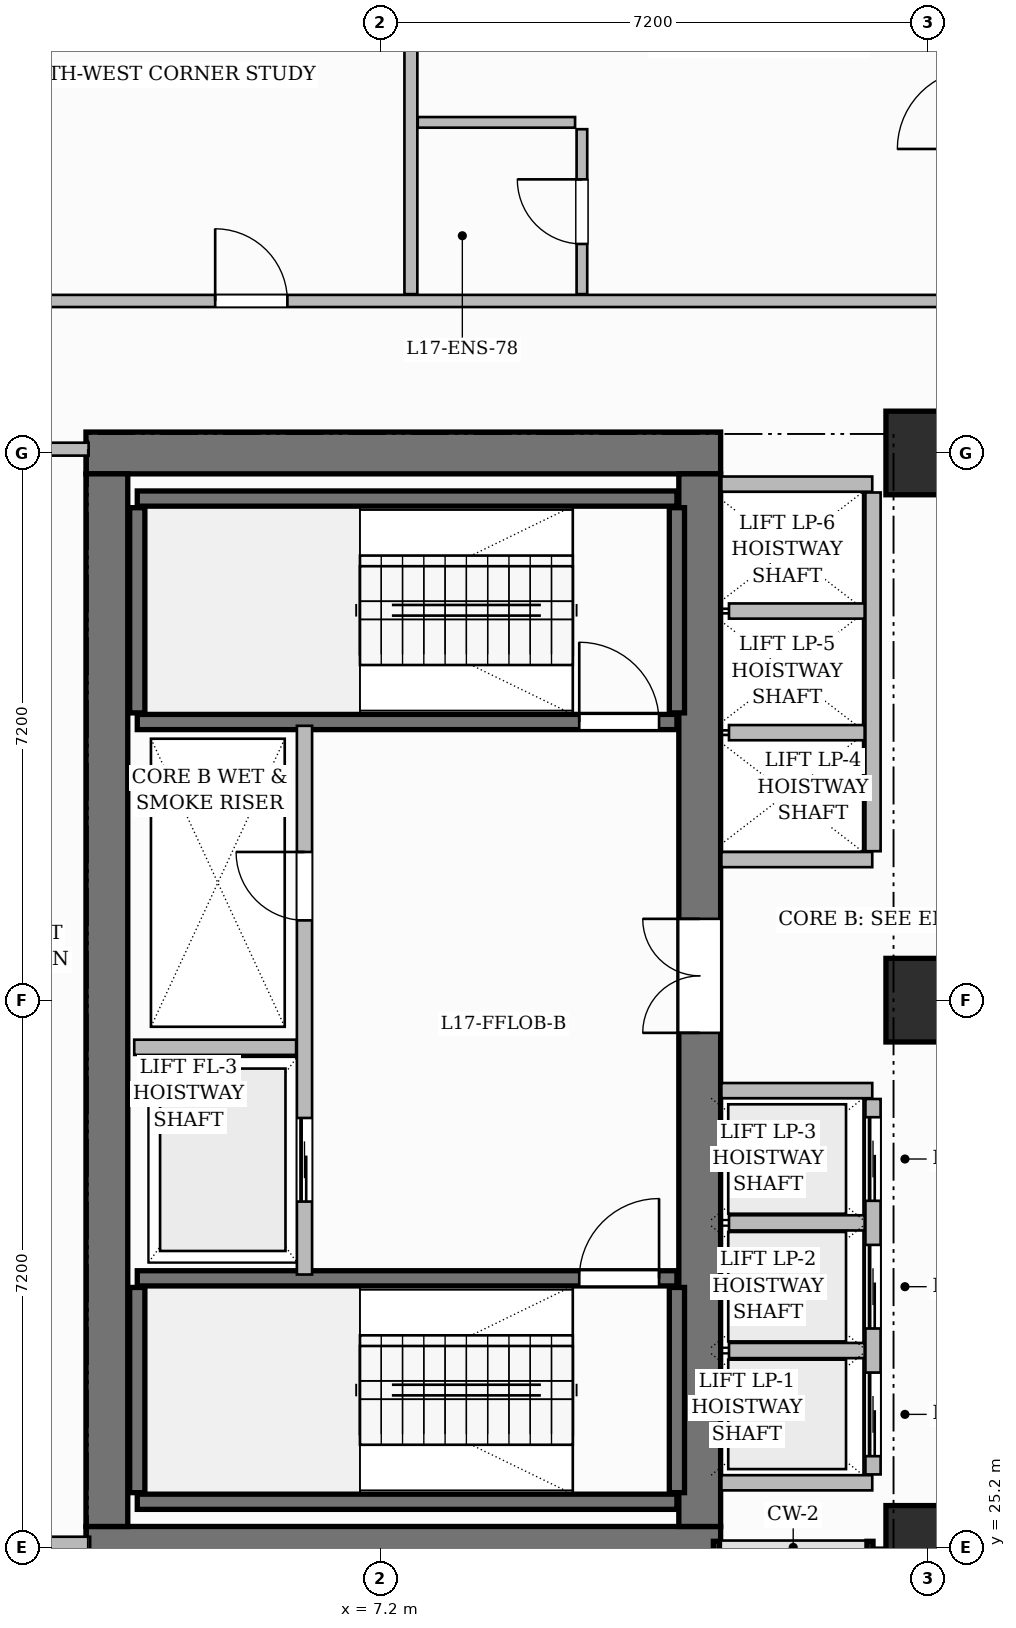
"""IFC4 building model, lengths in metres.
Left out: names, types, materials, properties, quantities, classifications, styles, units other than length and angle.
Written with IfcOpenShell. Run it as: python <this file> out.ifc"""

import sys

from ifc_helpers import new_model, si_unit, direction, frame, frame_2d, origin, origin_2d, place, context, subcontext, project, spatial, rectangle, extrude, source, transform, mapped, element, fill, save


model = new_model("IFC4")
c1 = context("Model", 3, precision=1e-05, world=origin(), true_north=direction((0.0, 1.0)))
c2 = subcontext(c1, "Body", "Model", "MODEL_VIEW")
j1 = project(units=[si_unit("LENGTHUNIT", "METRE"), si_unit("PLANEANGLEUNIT", "RADIAN")], contexts=[c1])
p1 = place(None, origin())
s1 = spatial("IfcSite", under=j1, at=p1, CompositionType="ELEMENT")
p2 = place(p1, origin())
s2 = spatial("IfcBuilding", under=s1, at=p2, CompositionType="ELEMENT")
p3 = place(p2, frame((0.0, 0.0, 73.1)))
s3 = spatial("IfcBuildingStorey", under=s2, at=p3, CompositionType="ELEMENT", Elevation=73.1)
for number, where, z_axis, x_axis in (
    (1, (3.325, 25.2, 0.0), (0.0, 0.0, 1.0), (1.0, 0.0, 0.0)),
    (2, (3.325, 39.6, 0.0), (0.0, 0.0, 1.0), (1.0, 0.0, 0.0)),
):
    element("IfcWall", number, at=place(p3, frame(where, z_axis=z_axis, x_axis=x_axis)), inside=s3, PredefinedType="SHEAR", context=c2, shape_type="SweptSolid", body=[
        extrude(rectangle(XDim=8.35, YDim=0.55, at=frame_2d((4.175, 0.0))), origin(), (0.0, 0.0, 1.0), 3.7),
    ])
p4 = place(p3, frame((3.6, 25.475, 0.0), z_axis=(0.0, 0.0, 1.0), x_axis=(0.0, 1.0, 0.0)))
e3 = element("IfcWall", 3, at=p4, inside=s3, PredefinedType="SHEAR", context=c2, shape_type="SweptSolid", body=[
    extrude(rectangle(XDim=13.85, YDim=0.55, at=frame_2d((6.925, 0.0))), origin(), (0.0, 0.0, 1.0), 3.7),
])
p5 = place(p3, frame((11.4, 25.475, 0.0), z_axis=(0.0, 0.0, 1.0), x_axis=(0.0, 1.0, 0.0)))
e4 = element("IfcWall", 4, at=p5, inside=s3, PredefinedType="SHEAR", context=c2, shape_type="SweptSolid", body=[
    extrude(rectangle(XDim=13.85, YDim=0.55, at=frame_2d((6.925, 0.0))), origin(), (0.0, 0.0, 1.0), 3.7),
])
p6 = place(p5, frame((6.495, 0.0, 0.0)))
e5 = element("IfcOpeningElement", 5, at=p6, cuts=e4, PredefinedType="OPENING", context=c2, shape_type="SweptSolid", body=[
    extrude(rectangle(XDim=1.5, YDim=2.2, at=frame_2d((0.75, 1.1))), frame((0.0, 0.285, 0.0), z_axis=(0.0, -1.0, 0.0), x_axis=(1.0, 0.0, 0.0)), (0.0, 0.0, 1.0), 0.57),
])
m1 = source(origin(), c2, "Body", "SweptSolid", [
    extrude(rectangle(XDim=1.1, YDim=1.1, at=origin_2d()), origin(), (0.0, 0.0, 1.0), 3.7),
])
for number, where, z_axis, x_axis in (
    (6, (14.4, 25.2, 0.0), (0.0, 0.0, 1.0), (1.0, 0.0, 0.0)),
    (7, (14.4, 32.4, 0.0), (0.0, 0.0, 1.0), (1.0, 0.0, 0.0)),
    (8, (14.4, 39.6, 0.0), (0.0, 0.0, 1.0), (1.0, 0.0, 0.0)),
):
    element("IfcColumn", number, at=place(p3, frame(where, z_axis=z_axis, x_axis=x_axis)), inside=s3, PredefinedType="COLUMN", context=c2, shape_type="MappedRepresentation", body=[
        mapped(m1, transform((0.0, 0.0, 0.0), scale=1.0)),
    ])
p7 = place(p3, frame((4.0, 25.8, 0.0), z_axis=(0.0, 0.0, 1.0), x_axis=(1.0, 0.0, 0.0)))
e9 = element("IfcWall", 9, at=p7, inside=s3, PredefinedType="SHEAR", context=c2, shape_type="SweptSolid", body=[
    extrude(rectangle(XDim=7.1, YDim=0.2, at=frame_2d((3.55, 0.0))), origin(), (0.0, 0.0, 1.0), 3.7),
])
for number, where, z_axis, x_axis in (
    (10, (4.0, 25.92, 0.0), (0.0, 0.0, 1.0), (0.0, 1.0, 0.0)),
    (11, (11.1, 25.92, 0.0), (0.0, 0.0, 1.0), (0.0, 1.0, 0.0)),
):
    element("IfcWall", number, at=place(p3, frame(where, z_axis=z_axis, x_axis=x_axis)), inside=s3, PredefinedType="SHEAR", context=c2, shape_type="SweptSolid", body=[
        extrude(rectangle(XDim=2.7, YDim=0.2, at=frame_2d((1.35, 0.0))), origin(), (0.0, 0.0, 1.0), 3.7),
    ])
p8 = place(p3, frame((4.0, 28.74, 0.0), z_axis=(0.0, 0.0, 1.0), x_axis=(1.0, 0.0, 0.0)))
e12 = element("IfcWall", 12, at=p8, inside=s3, PredefinedType="SHEAR", context=c2, shape_type="SweptSolid", body=[
    extrude(rectangle(XDim=7.1, YDim=0.2, at=frame_2d((3.55, 0.0))), origin(), (0.0, 0.0, 1.0), 3.7),
])
p9 = place(p8, frame((5.815, 0.0, 0.0)))
e13 = element("IfcOpeningElement", 13, at=p9, cuts=e12, PredefinedType="OPENING", context=c2, shape_type="SweptSolid", body=[
    extrude(rectangle(XDim=1.05, YDim=2.2, at=frame_2d((0.525, 1.1))), frame((0.0, 0.11, 0.0), z_axis=(0.0, -1.0, 0.0), x_axis=(1.0, 0.0, 0.0)), (0.0, 0.0, 1.0), 0.22),
])
p10 = place(p3, frame((4.0, 39.0, 0.0), z_axis=(0.0, 0.0, 1.0), x_axis=(1.0, 0.0, 0.0)))
e14 = element("IfcWall", 14, at=p10, inside=s3, PredefinedType="SHEAR", context=c2, shape_type="SweptSolid", body=[
    extrude(rectangle(XDim=7.1, YDim=0.2, at=frame_2d((3.55, 0.0))), origin(), (0.0, 0.0, 1.0), 3.7),
])
for number, where, z_axis, x_axis in (
    (15, (4.0, 36.18, 0.0), (0.0, 0.0, 1.0), (0.0, 1.0, 0.0)),
    (16, (11.1, 36.18, 0.0), (0.0, 0.0, 1.0), (0.0, 1.0, 0.0)),
):
    element("IfcWall", number, at=place(p3, frame(where, z_axis=z_axis, x_axis=x_axis)), inside=s3, PredefinedType="SHEAR", context=c2, shape_type="SweptSolid", body=[
        extrude(rectangle(XDim=2.7, YDim=0.2, at=frame_2d((1.35, 0.0))), origin(), (0.0, 0.0, 1.0), 3.7),
    ])
p11 = place(p3, frame((4.0, 36.06, 0.0), z_axis=(0.0, 0.0, 1.0), x_axis=(1.0, 0.0, 0.0)))
e17 = element("IfcWall", 17, at=p11, inside=s3, PredefinedType="SHEAR", context=c2, shape_type="SweptSolid", body=[
    extrude(rectangle(XDim=7.1, YDim=0.2, at=frame_2d((3.55, 0.0))), origin(), (0.0, 0.0, 1.0), 3.7),
])
p12 = place(p11, frame((5.815, 0.0, 0.0)))
e18 = element("IfcOpeningElement", 18, at=p12, cuts=e17, PredefinedType="OPENING", context=c2, shape_type="SweptSolid", body=[
    extrude(rectangle(XDim=1.05, YDim=2.2, at=frame_2d((0.525, 1.1))), frame((0.0, 0.11, 0.0), z_axis=(0.0, -1.0, 0.0), x_axis=(1.0, 0.0, 0.0)), (0.0, 0.0, 1.0), 0.22),
])
p13 = place(p3, frame((6.2, 28.79, 0.0), z_axis=(0.0, 0.0, 1.0), x_axis=(0.0, 1.0, 0.0)))
e19 = element("IfcWall", 19, at=p13, inside=s3, PredefinedType="PARTITIONING", context=c2, shape_type="SweptSolid", body=[
    extrude(rectangle(XDim=7.22, YDim=0.2, at=frame_2d((3.61, 0.0))), origin(), (0.0, 0.0, 1.0), 3.45),
])
p14 = place(p13, frame((4.66, 0.0, 0.0)))
e20 = element("IfcOpeningElement", 20, at=p14, cuts=e19, PredefinedType="OPENING", context=c2, shape_type="SweptSolid", body=[
    extrude(rectangle(XDim=0.9, YDim=2.1, at=frame_2d((0.45, 1.05))), frame((0.0, 0.11, 0.0), z_axis=(0.0, -1.0, 0.0), x_axis=(1.0, 0.0, 0.0)), (0.0, 0.0, 1.0), 0.22),
])
p15 = place(p13, frame((0.96, 0.0, 0.0)))
e21 = element("IfcOpeningElement", 21, at=p15, cuts=e19, PredefinedType="OPENING", context=c2, shape_type="SweptSolid", body=[
    extrude(rectangle(XDim=1.1, YDim=2.2, at=frame_2d((0.55, 1.1))), frame((0.0, 0.11, 0.0), z_axis=(0.0, -1.0, 0.0), x_axis=(1.0, 0.0, 0.0)), (0.0, 0.0, 1.0), 0.22),
])
p16 = place(p3, frame((3.96, 31.78, 0.0), z_axis=(0.0, 0.0, 1.0), x_axis=(1.0, 0.0, 0.0)))
e22 = element("IfcWall", 22, at=p16, inside=s3, PredefinedType="PARTITIONING", context=c2, shape_type="SweptSolid", body=[
    extrude(rectangle(XDim=2.13, YDim=0.2, at=frame_2d((1.065, 0.0))), origin(), (0.0, 0.0, 1.0), 3.45),
])
for number, where, z_axis, x_axis in (
    (23, (11.685, 26.05, 0.0), (0.0, 0.0, 1.0), (1.0, 0.0, 0.0)),
    (24, (11.685, 31.21, 0.0), (0.0, 0.0, 1.0), (1.0, 0.0, 0.0)),
):
    element("IfcWall", number, at=place(p3, frame(where, z_axis=z_axis, x_axis=x_axis)), inside=s3, PredefinedType="PARTITIONING", context=c2, shape_type="SweptSolid", body=[
        extrude(rectangle(XDim=1.985, YDim=0.2, at=frame_2d((0.992, 0.0))), origin(), (0.0, 0.0, 1.0), 3.45),
    ])
p17 = place(p3, frame((13.68, 26.16, 0.0), z_axis=(0.0, 0.0, 1.0), x_axis=(0.0, 1.0, 0.0)))
e25 = element("IfcWall", 25, at=p17, inside=s3, PredefinedType="PARTITIONING", context=c2, shape_type="SweptSolid", body=[
    extrude(rectangle(XDim=4.94, YDim=0.2, at=frame_2d((2.47, 0.0))), origin(), (0.0, 0.0, 1.0), 3.45),
])
p18 = place(p17, frame((0.24, 0.0, 0.0)))
e26 = element("IfcOpeningElement", 26, at=p18, cuts=e25, PredefinedType="OPENING", context=c2, shape_type="SweptSolid", body=[
    extrude(rectangle(XDim=1.1, YDim=2.2, at=frame_2d((0.55, 1.1))), frame((0.0, 0.11, 0.0), z_axis=(0.0, -1.0, 0.0), x_axis=(1.0, 0.0, 0.0)), (0.0, 0.0, 1.0), 0.22),
])
p19 = place(p17, frame((1.92, 0.0, 0.0)))
e27 = element("IfcOpeningElement", 27, at=p19, cuts=e25, PredefinedType="OPENING", context=c2, shape_type="SweptSolid", body=[
    extrude(rectangle(XDim=1.1, YDim=2.2, at=frame_2d((0.55, 1.1))), frame((0.0, 0.11, 0.0), z_axis=(0.0, -1.0, 0.0), x_axis=(1.0, 0.0, 0.0)), (0.0, 0.0, 1.0), 0.22),
])
p20 = place(p17, frame((3.6, 0.0, 0.0)))
e28 = element("IfcOpeningElement", 28, at=p20, cuts=e25, PredefinedType="OPENING", context=c2, shape_type="SweptSolid", body=[
    extrude(rectangle(XDim=1.1, YDim=2.2, at=frame_2d((0.55, 1.1))), frame((0.0, 0.11, 0.0), z_axis=(0.0, -1.0, 0.0), x_axis=(1.0, 0.0, 0.0)), (0.0, 0.0, 1.0), 0.22),
])
for number, where, z_axis, x_axis in (
    (29, (11.785, 27.79, 0.0), (0.0, 0.0, 1.0), (1.0, 0.0, 0.0)),
    (30, (11.785, 29.47, 0.0), (0.0, 0.0, 1.0), (1.0, 0.0, 0.0)),
):
    element("IfcWall", number, at=place(p3, frame(where, z_axis=z_axis, x_axis=x_axis)), inside=s3, PredefinedType="PARTITIONING", context=c2, shape_type="SweptSolid", body=[
        extrude(rectangle(XDim=1.785, YDim=0.2, at=frame_2d((0.893, 0.0))), origin(), (0.0, 0.0, 1.0), 3.45),
    ])
for number, where, z_axis, x_axis in (
    (31, (11.685, 34.25, 0.0), (0.0, 0.0, 1.0), (1.0, 0.0, 0.0)),
    (32, (11.685, 39.19, 0.0), (0.0, 0.0, 1.0), (1.0, 0.0, 0.0)),
):
    element("IfcWall", number, at=place(p3, frame(where, z_axis=z_axis, x_axis=x_axis)), inside=s3, PredefinedType="PARTITIONING", context=c2, shape_type="SweptSolid", body=[
        extrude(rectangle(XDim=1.985, YDim=0.2, at=frame_2d((0.992, 0.0))), origin(), (0.0, 0.0, 1.0), 3.45),
    ])
p21 = place(p3, frame((13.68, 34.36, 0.0), z_axis=(0.0, 0.0, 1.0), x_axis=(0.0, 1.0, 0.0)))
e33 = element("IfcWall", 33, at=p21, inside=s3, PredefinedType="PARTITIONING", context=c2, shape_type="SweptSolid", body=[
    extrude(rectangle(XDim=4.72, YDim=0.2, at=frame_2d((2.36, 0.0))), origin(), (0.0, 0.0, 1.0), 3.45),
])
for number, where, z_axis, x_axis in (
    (34, (11.785, 35.92, 0.0), (0.0, 0.0, 1.0), (1.0, 0.0, 0.0)),
    (35, (11.785, 37.52, 0.0), (0.0, 0.0, 1.0), (1.0, 0.0, 0.0)),
):
    element("IfcWall", number, at=place(p3, frame(where, z_axis=z_axis, x_axis=x_axis)), inside=s3, PredefinedType="PARTITIONING", context=c2, shape_type="SweptSolid", body=[
        extrude(rectangle(XDim=1.785, YDim=0.2, at=frame_2d((0.893, 0.0))), origin(), (0.0, 0.0, 1.0), 3.45),
    ])
p22 = place(p3, frame((0.24, 39.65, 0.0), z_axis=(0.0, 0.0, 1.0), x_axis=(1.0, 0.0, 0.0)))
e36 = element("IfcWall", 36, at=p22, inside=s3, PredefinedType="PARTITIONING", context=c2, shape_type="SweptSolid", body=[
    extrude(rectangle(XDim=3.12, YDim=0.17, at=frame_2d((1.56, 0.0))), origin(), (0.0, 0.0, 1.0), 3.45),
])
p23 = place(p22, frame((1.11, 0.0, 0.0)))
e37 = element("IfcOpeningElement", 37, at=p23, cuts=e36, PredefinedType="OPENING", context=c2, shape_type="SweptSolid", body=[
    extrude(rectangle(XDim=0.9, YDim=2.15, at=frame_2d((0.45, 1.075))), frame((0.0, 0.095, 0.0), z_axis=(0.0, -1.0, 0.0), x_axis=(1.0, 0.0, 0.0)), (0.0, 0.0, 1.0), 0.19),
])
p24 = place(p3, frame((7.6, 41.69, 0.0), z_axis=(0.0, 0.0, 1.0), x_axis=(0.0, 1.0, 0.0)))
e38 = element("IfcWall", 38, at=p24, inside=s3, PredefinedType="PARTITIONING", context=c2, shape_type="SweptSolid", body=[
    extrude(rectangle(XDim=4.87, YDim=0.17, at=frame_2d((2.435, 0.0))), origin(), (0.0, 0.0, 1.0), 3.45),
])
p25 = place(p3, frame((0.148, 41.6, 0.0), z_axis=(0.0, 0.0, 1.0), x_axis=(1.0, 0.0, 0.0)))
e39 = element("IfcWall", 39, at=p25, inside=s3, PredefinedType="PARTITIONING", context=c2, shape_type="SweptSolid", body=[
    extrude(rectangle(XDim=14.812, YDim=0.16, at=frame_2d((7.406, 0.0))), origin(), (0.0, 0.0, 1.0), 2.885),
])
p26 = place(p25, frame((4.877, 0.0, 0.0)))
e40 = element("IfcOpeningElement", 40, at=p26, cuts=e39, PredefinedType="OPENING", context=c2, shape_type="SweptSolid", body=[
    extrude(rectangle(XDim=0.95, YDim=2.15, at=frame_2d((0.475, 1.075))), frame((0.0, 0.09, 0.0), z_axis=(0.0, -1.0, 0.0), x_axis=(1.0, 0.0, 0.0)), (0.0, 0.0, 1.0), 0.18),
])
p27 = place(p3, frame((7.69, 43.95, 0.0), z_axis=(0.0, 0.0, 1.0), x_axis=(1.0, 0.0, 0.0)))
e41 = element("IfcWall", 41, at=p27, inside=s3, PredefinedType="PARTITIONING", context=c2, shape_type="SweptSolid", body=[
    extrude(rectangle(XDim=2.07, YDim=0.14, at=frame_2d((1.035, 0.0))), origin(), (0.0, 0.0, 1.0), 2.885),
])
p28 = place(p3, frame((9.85, 41.69, 0.0), z_axis=(0.0, 0.0, 1.0), x_axis=(0.0, 1.0, 0.0)))
e42 = element("IfcWall", 42, at=p28, inside=s3, PredefinedType="PARTITIONING", context=c2, shape_type="SweptSolid", body=[
    extrude(rectangle(XDim=2.17, YDim=0.14, at=frame_2d((1.085, 0.0))), origin(), (0.0, 0.0, 1.0), 3.45),
])
p29 = place(p28, frame((0.66, 0.0, 0.0)))
e43 = element("IfcOpeningElement", 43, at=p29, cuts=e42, PredefinedType="OPENING", context=c2, shape_type="SweptSolid", body=[
    extrude(rectangle(XDim=0.85, YDim=2.1, at=frame_2d((0.425, 1.05))), frame((0.0, 0.08, 0.0), z_axis=(0.0, -1.0, 0.0), x_axis=(1.0, 0.0, 0.0)), (0.0, 0.0, 1.0), 0.16),
])
p30 = place(p3, frame((0.0, 25.2, 0.0), z_axis=(0.0, 0.0, 1.0), x_axis=(1.0, 0.0, 0.0)))
e44 = element("IfcWall", 44, at=p30, inside=s3, PredefinedType="SOLIDWALL", context=c2, shape_type="SweptSolid", body=[
    extrude(rectangle(XDim=3.38, YDim=0.28, at=frame_2d((1.69, 0.0))), origin(), (0.0, 0.0, 1.0), 3.45),
])
p31 = place(p30, frame((1.205, 0.0, 0.8)))
e45 = element("IfcOpeningElement", 45, at=p31, cuts=e44, PredefinedType="OPENING", context=c2, shape_type="SweptSolid", body=[
    extrude(rectangle(XDim=1.4, YDim=1.85, at=frame_2d((0.7, 0.925))), frame((0.0, 0.15, 0.0), z_axis=(0.0, -1.0, 0.0), x_axis=(1.0, 0.0, 0.0)), (0.0, 0.0, 1.0), 0.3),
])
m2 = source(origin(), c2, "Body", "SweptSolid", [
    extrude(rectangle(XDim=1.05, YDim=2.2, at=frame_2d((0.525, 1.1))), frame((0.0, 0.025, 0.0), z_axis=(0.0, -1.0, 0.0), x_axis=(1.0, 0.0, 0.0)), (0.0, 0.0, 1.0), 0.05),
])
p32 = place(p9, origin())
e46 = element("IfcDoor", 46, at=p32, inside=s3, OperationType="SINGLE_SWING_RIGHT", PredefinedType="DOOR", context=c2, shape_type="MappedRepresentation", body=[
    mapped(m2, transform((0.0, 0.0, 0.0), scale=1.0)),
])
fill(e13, e46)
p33 = place(p12, origin())
e47 = element("IfcDoor", 47, at=p33, inside=s3, OperationType="SINGLE_SWING_LEFT", PredefinedType="DOOR", context=c2, shape_type="MappedRepresentation", body=[
    mapped(m2, transform((0.0, 0.0, 0.0), scale=1.0)),
])
fill(e18, e47)
m3 = source(origin(), c2, "Body", "SweptSolid", [
    extrude(rectangle(XDim=0.9, YDim=2.1, at=frame_2d((0.45, 1.05))), frame((0.0, 0.025, 0.0), z_axis=(0.0, -1.0, 0.0), x_axis=(1.0, 0.0, 0.0)), (0.0, 0.0, 1.0), 0.05),
])
p34 = place(p14, origin())
e48 = element("IfcDoor", 48, at=p34, inside=s3, OperationType="SINGLE_SWING_RIGHT", PredefinedType="DOOR", context=c2, shape_type="MappedRepresentation", body=[
    mapped(m3, transform((0.0, 0.0, 0.0), scale=1.0)),
])
fill(e20, e48)
m4 = source(origin(), c2, "Body", "SweptSolid", [
    extrude(rectangle(XDim=1.5, YDim=2.2, at=frame_2d((0.75, 1.1))), frame((0.0, 0.025, 0.0), z_axis=(0.0, -1.0, 0.0), x_axis=(1.0, 0.0, 0.0)), (0.0, 0.0, 1.0), 0.05),
])
p35 = place(p6, origin())
e49 = element("IfcDoor", 49, at=p35, inside=s3, OperationType="DOUBLE_DOOR_SINGLE_SWING", PredefinedType="DOOR", context=c2, shape_type="MappedRepresentation", body=[
    mapped(m4, transform((0.0, 0.0, 0.0), scale=1.0)),
])
fill(e5, e49)
m5 = source(origin(), c2, "Body", "SweptSolid", [
    extrude(rectangle(XDim=0.95, YDim=2.15, at=frame_2d((0.475, 1.075))), frame((0.0, 0.025, 0.0), z_axis=(0.0, -1.0, 0.0), x_axis=(1.0, 0.0, 0.0)), (0.0, 0.0, 1.0), 0.05),
])
p36 = place(p26, origin())
e50 = element("IfcDoor", 50, at=p36, inside=s3, OperationType="SINGLE_SWING_LEFT", PredefinedType="DOOR", context=c2, shape_type="MappedRepresentation", body=[
    mapped(m5, transform((0.0, 0.0, 0.0), scale=1.0)),
])
fill(e40, e50)
m6 = source(origin(), c2, "Body", "SweptSolid", [
    extrude(rectangle(XDim=0.85, YDim=2.1, at=frame_2d((0.425, 1.05))), frame((0.0, 0.025, 0.0), z_axis=(0.0, -1.0, 0.0), x_axis=(1.0, 0.0, 0.0)), (0.0, 0.0, 1.0), 0.05),
])
p37 = place(p29, origin())
e51 = element("IfcDoor", 51, at=p37, inside=s3, OperationType="SINGLE_SWING_RIGHT", PredefinedType="DOOR", context=c2, shape_type="MappedRepresentation", body=[
    mapped(m6, transform((0.0, 0.0, 0.0), scale=1.0)),
])
fill(e43, e51)
m7 = source(origin(), c2, "Body", "SweptSolid", [
    extrude(rectangle(XDim=1.1, YDim=2.2, at=frame_2d((0.55, 1.1))), frame((0.0, 0.025, 0.0), z_axis=(0.0, -1.0, 0.0), x_axis=(1.0, 0.0, 0.0)), (0.0, 0.0, 1.0), 0.05),
])
p38 = place(p15, origin())
e52 = element("IfcDoor", 52, at=p38, inside=s3, OperationType="SLIDING_TO_LEFT", PredefinedType="DOOR", context=c2, shape_type="MappedRepresentation", body=[
    mapped(m7, transform((0.0, 0.0, 0.0), scale=1.0)),
])
fill(e21, e52)
p39 = place(p18, origin())
e53 = element("IfcDoor", 53, at=p39, inside=s3, OperationType="SLIDING_TO_LEFT", PredefinedType="DOOR", context=c2, shape_type="MappedRepresentation", body=[
    mapped(m7, transform((0.0, 0.0, 0.0), scale=1.0)),
])
fill(e26, e53)
p40 = place(p19, origin())
e54 = element("IfcDoor", 54, at=p40, inside=s3, OperationType="SLIDING_TO_LEFT", PredefinedType="DOOR", context=c2, shape_type="MappedRepresentation", body=[
    mapped(m7, transform((0.0, 0.0, 0.0), scale=1.0)),
])
fill(e27, e54)
p41 = place(p20, origin())
e55 = element("IfcDoor", 55, at=p41, inside=s3, OperationType="SLIDING_TO_LEFT", PredefinedType="DOOR", context=c2, shape_type="MappedRepresentation", body=[
    mapped(m7, transform((0.0, 0.0, 0.0), scale=1.0)),
])
fill(e28, e55)
save(model, sys.argv[1])
